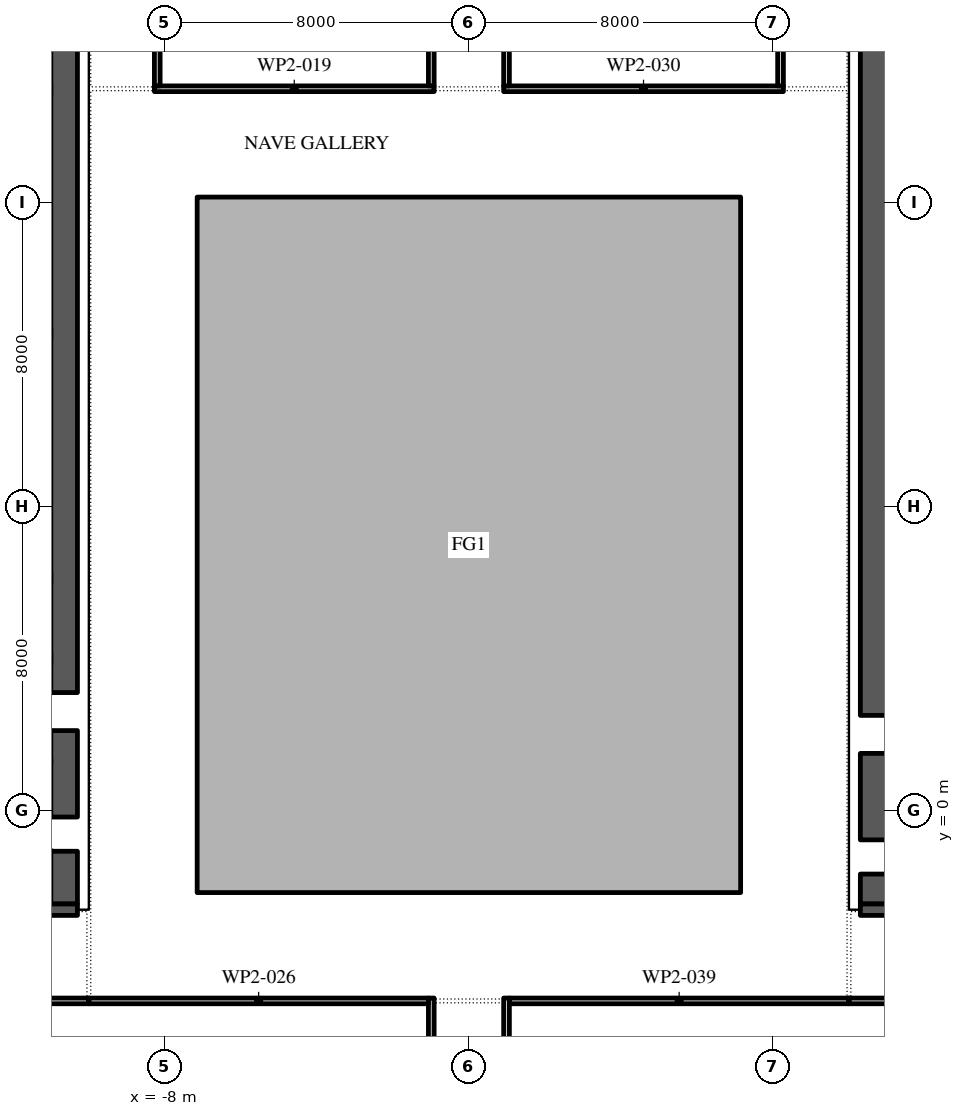
"""IFC4 building model, lengths in metres.
Left out: names, types, materials, properties, quantities, classifications, styles, units other than length and angle.
Written with IfcOpenShell. Run it as: python <this file> out.ifc"""

import sys

from ifc_helpers import new_model, si_unit, direction, frame, frame_2d, origin, place, context, subcontext, project, spatial, polyline, rectangle, outline, extrude, element, save


model = new_model("IFC4")
c1 = context("Model", 3, precision=1e-05, world=origin(), true_north=direction((0.0, 1.0)))
c2 = subcontext(c1, "Body", "Model", "MODEL_VIEW")
j1 = project(units=[si_unit("LENGTHUNIT", "METRE"), si_unit("PLANEANGLEUNIT", "RADIAN")], contexts=[c1])
p1 = place(None, origin())
s1 = spatial("IfcSite", under=j1, at=p1, CompositionType="ELEMENT")
p2 = place(p1, origin())
s2 = spatial("IfcBuilding", under=s1, at=p2, CompositionType="ELEMENT")
p3 = place(p2, frame((0.0, 0.0, 196.8)))
s3 = spatial("IfcBuildingStorey", under=s2, at=p3, CompositionType="ELEMENT", Elevation=196.8)
p4 = place(p3, origin())
e1 = element("IfcWall", 1, at=p4, inside=s3, PredefinedType="STANDARD", context=c2, shape_type="SweptSolid", body=[
    extrude(outline(polyline([(-7.15, -2.15), (7.15, -2.15), (7.15, 16.15), (-7.15, 16.15), (-7.15, -2.15)]), holes=[polyline([(-7.0, -2.0), (-7.0, 16.0), (7.0, 16.0), (7.0, -2.0), (-7.0, -2.0)])]), origin(), (0.0, 0.0, 1.0), 4.0),
])
p5 = place(p3, frame((-10.65, -2.45, 0.0), z_axis=(0.0, 0.0, 1.0), x_axis=(0.0, 1.0, 0.0)))
e2 = element("IfcWall", 2, at=p5, inside=s3, PredefinedType="SHEAR", context=c2, shape_type="SweptSolid", body=[
    extrude(rectangle(XDim=27.9, YDim=0.7, at=frame_2d((13.95, 0.0))), origin(), (0.0, 0.0, 1.0), 4.0),
])
p6 = place(p5, frame((23.65, 0.0, 0.0)))
e3 = element("IfcOpeningElement", 3, at=p6, cuts=e2, PredefinedType="OPENING", context=c2, shape_type="SweptSolid", body=[
    extrude(rectangle(XDim=2.4, YDim=2.1, at=frame_2d((1.2, 1.05))), frame((0.0, 0.36, 0.0), z_axis=(0.0, -1.0, 0.0), x_axis=(1.0, 0.0, 0.0)), (0.0, 0.0, 1.0), 0.72),
])
p7 = place(p5, frame((1.387, 0.0, 0.0)))
e4 = element("IfcOpeningElement", 4, at=p7, cuts=e2, PredefinedType="OPENING", context=c2, shape_type="SweptSolid", body=[
    extrude(rectangle(XDim=0.9, YDim=2.1, at=frame_2d((0.45, 1.05))), frame((0.0, 0.36, 0.0), z_axis=(0.0, -1.0, 0.0), x_axis=(1.0, 0.0, 0.0)), (0.0, 0.0, 1.0), 0.72),
])
p8 = place(p5, frame((4.562, 0.0, 0.0)))
e5 = element("IfcOpeningElement", 5, at=p8, cuts=e2, PredefinedType="OPENING", context=c2, shape_type="SweptSolid", body=[
    extrude(rectangle(XDim=1.0, YDim=2.1, at=frame_2d((0.5, 1.05))), frame((0.0, 0.36, 0.0), z_axis=(0.0, -1.0, 0.0), x_axis=(1.0, 0.0, 0.0)), (0.0, 0.0, 1.0), 0.72),
])
p9 = place(p3, frame((-21.7, -2.6, 0.0), z_axis=(0.0, 0.0, 1.0), x_axis=(1.0, 0.0, 0.0)))
e6 = element("IfcWall", 6, at=p9, inside=s3, PredefinedType="SHEAR", context=c2, shape_type="SweptSolid", body=[
    extrude(rectangle(XDim=11.4, YDim=0.3, at=frame_2d((5.7, 0.0))), origin(), (0.0, 0.0, 1.0), 4.0),
])
p10 = place(p3, frame((10.65, -2.45, 0.0), z_axis=(0.0, 0.0, 1.0), x_axis=(0.0, 1.0, 0.0)))
e7 = element("IfcWall", 7, at=p10, inside=s3, PredefinedType="SHEAR", context=c2, shape_type="SweptSolid", body=[
    extrude(rectangle(XDim=27.9, YDim=0.7, at=frame_2d((13.95, 0.0))), origin(), (0.0, 0.0, 1.0), 4.0),
])
p11 = place(p10, frame((23.65, 0.0, 0.0)))
e8 = element("IfcOpeningElement", 8, at=p11, cuts=e7, PredefinedType="OPENING", context=c2, shape_type="SweptSolid", body=[
    extrude(rectangle(XDim=2.4, YDim=2.1, at=frame_2d((1.2, 1.05))), frame((0.0, 0.36, 0.0), z_axis=(0.0, -1.0, 0.0), x_axis=(1.0, 0.0, 0.0)), (0.0, 0.0, 1.0), 0.72),
])
p12 = place(p10, frame((0.788, 0.0, 0.0)))
e9 = element("IfcOpeningElement", 9, at=p12, cuts=e7, PredefinedType="OPENING", context=c2, shape_type="SweptSolid", body=[
    extrude(rectangle(XDim=0.9, YDim=2.1, at=frame_2d((0.45, 1.05))), frame((0.0, 0.36, 0.0), z_axis=(0.0, -1.0, 0.0), x_axis=(1.0, 0.0, 0.0)), (0.0, 0.0, 1.0), 0.72),
])
p13 = place(p10, frame((3.962, 0.0, 0.0)))
e10 = element("IfcOpeningElement", 10, at=p13, cuts=e7, PredefinedType="OPENING", context=c2, shape_type="SweptSolid", body=[
    extrude(rectangle(XDim=1.0, YDim=2.1, at=frame_2d((0.5, 1.05))), frame((0.0, 0.36, 0.0), z_axis=(0.0, -1.0, 0.0), x_axis=(1.0, 0.0, 0.0)), (0.0, 0.0, 1.0), 0.72),
])
p14 = place(p3, frame((10.3, -2.6, 0.0), z_axis=(0.0, 0.0, 1.0), x_axis=(1.0, 0.0, 0.0)))
e11 = element("IfcWall", 11, at=p14, inside=s3, PredefinedType="SHEAR", context=c2, shape_type="SweptSolid", body=[
    extrude(rectangle(XDim=11.4, YDim=0.3, at=frame_2d((5.7, 0.0))), origin(), (0.0, 0.0, 1.0), 4.0),
])
p15 = place(p3, frame((-10.0, -5.0, 0.0), z_axis=(0.0, 0.0, 1.0), x_axis=(-1.0, 0.0, 0.0)))
e12 = element("IfcWall", 12, at=p15, inside=s3, PredefinedType="PARTITIONING", context=c2, shape_type="SweptSolid", body=[
    extrude(rectangle(XDim=12.47, YDim=0.15, at=frame_2d((6.235, 0.0))), origin(), (0.0, 0.0, 1.0), 4.0),
])
p16 = place(p15, frame((8.37, 0.0, 0.0)))
e13 = element("IfcOpeningElement", 13, at=p16, cuts=e12, PredefinedType="OPENING", context=c2, shape_type="SweptSolid", body=[
    extrude(rectangle(XDim=1.0, YDim=2.1, at=frame_2d((0.5, 1.05))), frame((0.0, 0.085, 0.0), z_axis=(0.0, -1.0, 0.0), x_axis=(1.0, 0.0, 0.0)), (0.0, 0.0, 1.0), 0.17),
])
p17 = place(p3, frame((-8.275, 19.0, 0.0), z_axis=(0.0, 0.0, 1.0), x_axis=(1.0, 0.0, 0.0)))
e14 = element("IfcWall", 14, at=p17, inside=s3, PredefinedType="PARTITIONING", context=c2, shape_type="SweptSolid", body=[
    extrude(rectangle(XDim=7.36, YDim=0.15, at=frame_2d((3.68, 0.0))), origin(), (0.0, 0.0, 1.0), 4.0),
])
p18 = place(p3, frame((-8.2, 27.2, 0.0), z_axis=(0.0, 0.0, 1.0), x_axis=(0.0, -1.0, 0.0)))
e15 = element("IfcWall", 15, at=p18, inside=s3, PredefinedType="PARTITIONING", context=c2, shape_type="SweptSolid", body=[
    extrude(rectangle(XDim=8.125, YDim=0.15, at=frame_2d((4.062, 0.0))), origin(), (0.0, 0.0, 1.0), 4.0),
])
p19 = place(p3, frame((-0.99, -10.45, 0.0), z_axis=(0.0, 0.0, 1.0), x_axis=(0.0, 1.0, 0.0)))
e16 = element("IfcWall", 16, at=p19, inside=s3, PredefinedType="PARTITIONING", context=c2, shape_type="SweptSolid", body=[
    extrude(rectangle(XDim=5.525, YDim=0.15, at=frame_2d((2.762, 0.0))), origin(), (0.0, 0.0, 1.0), 4.0),
])
p20 = place(p3, frame((-1.065, -5.0, 0.0), z_axis=(0.0, 0.0, 1.0), x_axis=(-1.0, 0.0, 0.0)))
e17 = element("IfcWall", 17, at=p20, inside=s3, PredefinedType="PARTITIONING", context=c2, shape_type="SweptSolid", body=[
    extrude(rectangle(XDim=8.935, YDim=0.15, at=frame_2d((4.468, 0.0))), origin(), (0.0, 0.0, 1.0), 4.0),
])
p21 = place(p3, frame((-0.99, 19.075, 0.0), z_axis=(0.0, 0.0, 1.0), x_axis=(0.0, 1.0, 0.0)))
e18 = element("IfcWall", 18, at=p21, inside=s3, PredefinedType="PARTITIONING", context=c2, shape_type="SweptSolid", body=[
    extrude(rectangle(XDim=10.375, YDim=0.15, at=frame_2d((5.188, 0.0))), origin(), (0.0, 0.0, 1.0), 4.0),
])
p22 = place(p21, frame((6.775, 0.0, 0.0)))
e19 = element("IfcOpeningElement", 19, at=p22, cuts=e18, PredefinedType="OPENING", context=c2, shape_type="SweptSolid", body=[
    extrude(rectangle(XDim=1.0, YDim=2.1, at=frame_2d((0.5, 1.05))), frame((0.0, 0.085, 0.0), z_axis=(0.0, -1.0, 0.0), x_axis=(1.0, 0.0, 0.0)), (0.0, 0.0, 1.0), 0.17),
])
p23 = place(p3, frame((0.99, -4.925, 0.0), z_axis=(0.0, 0.0, 1.0), x_axis=(0.0, -1.0, 0.0)))
e20 = element("IfcWall", 20, at=p23, inside=s3, PredefinedType="PARTITIONING", context=c2, shape_type="SweptSolid", body=[
    extrude(rectangle(XDim=11.371, YDim=0.15, at=frame_2d((5.686, 0.0))), origin(), (0.0, 0.0, 1.0), 4.0),
])
p24 = place(p23, frame((2.945, 0.0, 0.0)))
e21 = element("IfcOpeningElement", 21, at=p24, cuts=e20, PredefinedType="OPENING", context=c2, shape_type="SweptSolid", body=[
    extrude(rectangle(XDim=1.0, YDim=2.1, at=frame_2d((0.5, 1.05))), frame((0.0, 0.085, 0.0), z_axis=(0.0, -1.0, 0.0), x_axis=(1.0, 0.0, 0.0)), (0.0, 0.0, 1.0), 0.17),
])
p25 = place(p3, frame((0.915, 19.0, 0.0), z_axis=(0.0, 0.0, 1.0), x_axis=(1.0, 0.0, 0.0)))
e22 = element("IfcWall", 22, at=p25, inside=s3, PredefinedType="PARTITIONING", context=c2, shape_type="SweptSolid", body=[
    extrude(rectangle(XDim=7.36, YDim=0.15, at=frame_2d((3.68, 0.0))), origin(), (0.0, 0.0, 1.0), 4.0),
])
p26 = place(p3, frame((0.99, 29.24, 0.0), z_axis=(0.0, 0.0, 1.0), x_axis=(0.0, -1.0, 0.0)))
e23 = element("IfcWall", 23, at=p26, inside=s3, PredefinedType="PARTITIONING", context=c2, shape_type="SweptSolid", body=[
    extrude(rectangle(XDim=10.165, YDim=0.15, at=frame_2d((5.083, 0.0))), origin(), (0.0, 0.0, 1.0), 4.0),
])
p27 = place(p26, frame((3.59, 0.0, 0.0)))
e24 = element("IfcOpeningElement", 24, at=p27, cuts=e23, PredefinedType="OPENING", context=c2, shape_type="SweptSolid", body=[
    extrude(rectangle(XDim=1.0, YDim=2.1, at=frame_2d((0.5, 1.05))), frame((0.0, 0.085, 0.0), z_axis=(0.0, -1.0, 0.0), x_axis=(1.0, 0.0, 0.0)), (0.0, 0.0, 1.0), 0.17),
])
p28 = place(p3, frame((8.2, 19.075, 0.0), z_axis=(0.0, 0.0, 1.0), x_axis=(0.0, 1.0, 0.0)))
e25 = element("IfcWall", 25, at=p28, inside=s3, PredefinedType="PARTITIONING", context=c2, shape_type="SweptSolid", body=[
    extrude(rectangle(XDim=8.125, YDim=0.15, at=frame_2d((4.062, 0.0))), origin(), (0.0, 0.0, 1.0), 4.0),
])
p29 = place(p3, frame((10.0, -5.0, 0.0), z_axis=(0.0, 0.0, 1.0), x_axis=(-1.0, 0.0, 0.0)))
e26 = element("IfcWall", 26, at=p29, inside=s3, PredefinedType="PARTITIONING", context=c2, shape_type="SweptSolid", body=[
    extrude(rectangle(XDim=8.935, YDim=0.15, at=frame_2d((4.468, 0.0))), origin(), (0.0, 0.0, 1.0), 4.0),
])
p30 = place(p3, frame((17.97, -5.0, 0.0), z_axis=(0.0, 0.0, 1.0), x_axis=(-1.0, 0.0, 0.0)))
e27 = element("IfcWall", 27, at=p30, inside=s3, PredefinedType="PARTITIONING", context=c2, shape_type="SweptSolid", body=[
    extrude(rectangle(XDim=7.97, YDim=0.15, at=frame_2d((3.985, 0.0))), origin(), (0.0, 0.0, 1.0), 4.0),
])
save(model, sys.argv[1])
